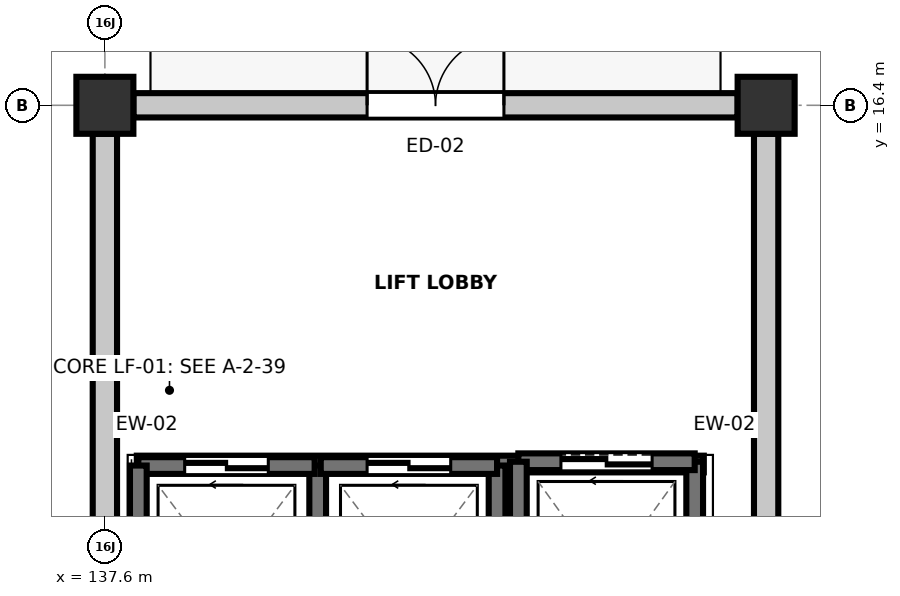
"""IFC4 building model, lengths in metres.
Left out: names, types, materials, properties, quantities, classifications, styles, units other than length and angle.
Written with IfcOpenShell. Run it as: python <this file> out.ifc"""

import sys

from ifc_helpers import new_model, si_unit, direction, frame, frame_2d, origin, origin_2d, place, context, subcontext, project, spatial, rectangle, extrude, element, fill, save


model = new_model("IFC4")
c1 = context("Model", 3, precision=1e-05, world=origin(), true_north=direction((0.0, 1.0)))
c2 = subcontext(c1, "Body", "Model", "MODEL_VIEW")
j1 = project(units=[si_unit("LENGTHUNIT", "METRE"), si_unit("PLANEANGLEUNIT", "RADIAN")], contexts=[c1])
p1 = place(None, origin())
s1 = spatial("IfcSite", under=j1, at=p1, CompositionType="ELEMENT")
p2 = place(p1, origin())
s2 = spatial("IfcBuilding", under=s1, at=p2, CompositionType="ELEMENT")
p3 = place(p2, origin())
s3 = spatial("IfcBuildingStorey", under=s2, at=p3, CompositionType="ELEMENT", Elevation=0.0)
for number, where, z_axis, x_axis in (
    (1, (137.6, 16.4, 0.0), (0.0, 0.0, 1.0), (1.0, 0.0, 0.0)),
    (2, (146.3, 16.4, 0.0), (0.0, 0.0, 1.0), (1.0, 0.0, 0.0)),
):
    element("IfcColumn", number, at=place(p3, frame(where, z_axis=z_axis, x_axis=x_axis)), inside=s3, PredefinedType="COLUMN", context=c2, shape_type="SweptSolid", body=[
        extrude(rectangle(XDim=0.75, YDim=0.75, at=origin_2d()), origin(), (0.0, 0.0, 1.0), 4.8),
    ])
p4 = place(p3, frame((146.3, 8.375, 0.0), z_axis=(0.0, 0.0, 1.0), x_axis=(0.0, 1.0, 0.0)))
e3 = element("IfcWall", 3, at=p4, inside=s3, PredefinedType="STANDARD", context=c2, shape_type="SweptSolid", body=[
    extrude(rectangle(XDim=7.65, YDim=0.32, at=frame_2d((3.825, 0.0))), origin(), (0.0, 0.0, 1.0), 3.585),
])
p5 = place(p3, frame((137.975, 16.4, 0.0), z_axis=(0.0, 0.0, 1.0), x_axis=(1.0, 0.0, 0.0)))
e4 = element("IfcWall", 4, at=p5, inside=s3, PredefinedType="STANDARD", context=c2, shape_type="SweptSolid", body=[
    extrude(rectangle(XDim=7.95, YDim=0.32, at=frame_2d((3.975, 0.0))), origin(), (0.0, 0.0, 1.0), 3.785),
])
p6 = place(p5, frame((3.075, 0.0, 0.0)))
e5 = element("IfcOpeningElement", 5, at=p6, cuts=e4, PredefinedType="OPENING", context=c2, shape_type="SweptSolid", body=[
    extrude(rectangle(XDim=1.8, YDim=2.25, at=frame_2d((0.9, 1.125))), frame((0.0, 0.17, 0.0), z_axis=(0.0, -1.0, 0.0), x_axis=(1.0, 0.0, 0.0)), (0.0, 0.0, 1.0), 0.34),
])
p7 = place(p3, frame((137.6, 16.025, 0.0), z_axis=(0.0, 0.0, 1.0), x_axis=(0.0, -1.0, 0.0)))
e6 = element("IfcWall", 6, at=p7, inside=s3, PredefinedType="STANDARD", context=c2, shape_type="SweptSolid", body=[
    extrude(rectangle(XDim=7.65, YDim=0.32, at=frame_2d((3.825, 0.0))), origin(), (0.0, 0.0, 1.0), 3.585),
])
p8 = place(p3, frame((138.02, 11.68, -1.4), z_axis=(0.0, 0.0, 1.0), x_axis=(1.0, 0.0, 0.0)))
e7 = element("IfcWall", 7, at=p8, inside=s3, PredefinedType="SHEAR", context=c2, shape_type="SweptSolid", body=[
    extrude(rectangle(XDim=7.46, YDim=0.22, at=frame_2d((3.73, 0.0))), origin(), (0.0, 0.0, 1.0), 1.12),
])
p9 = place(p3, frame((140.4, 8.74, 0.0), z_axis=(0.0, 0.0, 1.0), x_axis=(0.0, 1.0, 0.0)))
e8 = element("IfcWall", 8, at=p9, inside=s3, PredefinedType="SHEAR", context=c2, shape_type="SweptSolid", body=[
    extrude(rectangle(XDim=2.92, YDim=0.22, at=frame_2d((1.46, 0.0))), origin(), (0.0, 0.0, 1.0), 4.55),
])
p10 = place(p3, frame((140.36, 11.66, 0.0), z_axis=(0.0, 0.0, 1.0), x_axis=(-1.0, 0.0, 0.0)))
e9 = element("IfcWall", 9, at=p10, inside=s3, PredefinedType="SHEAR", context=c2, shape_type="SweptSolid", body=[
    extrude(rectangle(XDim=2.32, YDim=0.22, at=frame_2d((1.16, 0.0))), origin(), (0.0, 0.0, 1.0), 4.55),
])
p11 = place(p10, frame((0.61, 0.0, 0.0)))
e10 = element("IfcOpeningElement", 10, at=p11, cuts=e9, PredefinedType="OPENING", context=c2, shape_type="SweptSolid", body=[
    extrude(rectangle(XDim=1.1, YDim=2.15, at=frame_2d((0.55, 1.075))), frame((0.0, 0.12, 0.0), z_axis=(0.0, -1.0, 0.0), x_axis=(1.0, 0.0, 0.0)), (0.0, 0.0, 1.0), 0.24),
])
for number, where, z_axis, x_axis in (
    (11, (138.04, 11.66, 0.0), (0.0, 0.0, 1.0), (0.0, -1.0, 0.0)),
    (12, (142.76, 8.74, 0.0), (0.0, 0.0, 1.0), (0.0, 1.0, 0.0)),
):
    element("IfcWall", number, at=place(p3, frame(where, z_axis=z_axis, x_axis=x_axis)), inside=s3, PredefinedType="SHEAR", context=c2, shape_type="SweptSolid", body=[
        extrude(rectangle(XDim=2.92, YDim=0.22, at=frame_2d((1.46, 0.0))), origin(), (0.0, 0.0, 1.0), 4.55),
    ])
p12 = place(p3, frame((142.76, 11.66, 0.0), z_axis=(0.0, 0.0, 1.0), x_axis=(-1.0, 0.0, 0.0)))
e13 = element("IfcWall", 13, at=p12, inside=s3, PredefinedType="SHEAR", context=c2, shape_type="SweptSolid", body=[
    extrude(rectangle(XDim=2.32, YDim=0.22, at=frame_2d((1.16, 0.0))), origin(), (0.0, 0.0, 1.0), 4.55),
])
p13 = place(p12, frame((0.61, 0.0, 0.0)))
e14 = element("IfcOpeningElement", 14, at=p13, cuts=e13, PredefinedType="OPENING", context=c2, shape_type="SweptSolid", body=[
    extrude(rectangle(XDim=1.1, YDim=2.15, at=frame_2d((0.55, 1.075))), frame((0.0, 0.12, 0.0), z_axis=(0.0, -1.0, 0.0), x_axis=(1.0, 0.0, 0.0)), (0.0, 0.0, 1.0), 0.24),
])
p14 = place(p3, frame((145.36, 8.69, 0.0), z_axis=(0.0, 0.0, 1.0), x_axis=(0.0, 1.0, 0.0)))
e15 = element("IfcWall", 15, at=p14, inside=s3, PredefinedType="SHEAR", context=c2, shape_type="SweptSolid", body=[
    extrude(rectangle(XDim=3.02, YDim=0.22, at=frame_2d((1.51, 0.0))), origin(), (0.0, 0.0, 1.0), 4.55),
])
p15 = place(p3, frame((145.36, 11.71, 0.0), z_axis=(0.0, 0.0, 1.0), x_axis=(-1.0, 0.0, 0.0)))
e16 = element("IfcWall", 16, at=p15, inside=s3, PredefinedType="SHEAR", context=c2, shape_type="SweptSolid", body=[
    extrude(rectangle(XDim=2.32, YDim=0.22, at=frame_2d((1.16, 0.0))), origin(), (0.0, 0.0, 1.0), 4.55),
])
p16 = place(p15, frame((0.56, 0.0, 0.0)))
e17 = element("IfcOpeningElement", 17, at=p16, cuts=e16, PredefinedType="OPENING", context=c2, shape_type="SweptSolid", body=[
    extrude(rectangle(XDim=1.2, YDim=2.15, at=frame_2d((0.6, 1.075))), frame((0.0, 0.12, 0.0), z_axis=(0.0, -1.0, 0.0), x_axis=(1.0, 0.0, 0.0)), (0.0, 0.0, 1.0), 0.24),
])
p17 = place(p3, frame((143.04, 11.71, 0.0), z_axis=(0.0, 0.0, 1.0), x_axis=(0.0, -1.0, 0.0)))
e18 = element("IfcWall", 18, at=p17, inside=s3, PredefinedType="SHEAR", context=c2, shape_type="SweptSolid", body=[
    extrude(rectangle(XDim=3.02, YDim=0.22, at=frame_2d((1.51, 0.0))), origin(), (0.0, 0.0, 1.0), 4.55),
])
p18 = place(p6, origin())
e19 = element("IfcDoor", 19, at=p18, inside=s3, OperationType="DOUBLE_DOOR_SINGLE_SWING", PredefinedType="DOOR", context=c2, shape_type="SweptSolid", body=[
    extrude(rectangle(XDim=1.8, YDim=2.25, at=frame_2d((0.9, 1.125))), frame((0.0, 0.025, 0.0), z_axis=(0.0, -1.0, 0.0), x_axis=(1.0, 0.0, 0.0)), (0.0, 0.0, 1.0), 0.05),
])
fill(e5, e19)
p19 = place(p11, origin())
e20 = element("IfcDoor", 20, at=p19, inside=s3, OperationType="DOUBLE_DOOR_SLIDING", PredefinedType="DOOR", context=c2, shape_type="SweptSolid", body=[
    extrude(rectangle(XDim=1.1, YDim=2.15, at=frame_2d((0.55, 1.075))), frame((0.0, 0.025, 0.0), z_axis=(0.0, -1.0, 0.0), x_axis=(1.0, 0.0, 0.0)), (0.0, 0.0, 1.0), 0.05),
])
fill(e10, e20)
p20 = place(p13, origin())
e21 = element("IfcDoor", 21, at=p20, inside=s3, OperationType="DOUBLE_DOOR_SLIDING", PredefinedType="DOOR", context=c2, shape_type="SweptSolid", body=[
    extrude(rectangle(XDim=1.1, YDim=2.15, at=frame_2d((0.55, 1.075))), frame((0.0, 0.025, 0.0), z_axis=(0.0, -1.0, 0.0), x_axis=(1.0, 0.0, 0.0)), (0.0, 0.0, 1.0), 0.05),
])
fill(e14, e21)
p21 = place(p16, origin())
e22 = element("IfcDoor", 22, at=p21, inside=s3, OperationType="DOUBLE_DOOR_SLIDING", PredefinedType="DOOR", context=c2, shape_type="SweptSolid", body=[
    extrude(rectangle(XDim=1.2, YDim=2.15, at=frame_2d((0.6, 1.075))), frame((0.0, 0.025, 0.0), z_axis=(0.0, -1.0, 0.0), x_axis=(1.0, 0.0, 0.0)), (0.0, 0.0, 1.0), 0.05),
])
fill(e17, e22)
save(model, sys.argv[1])
